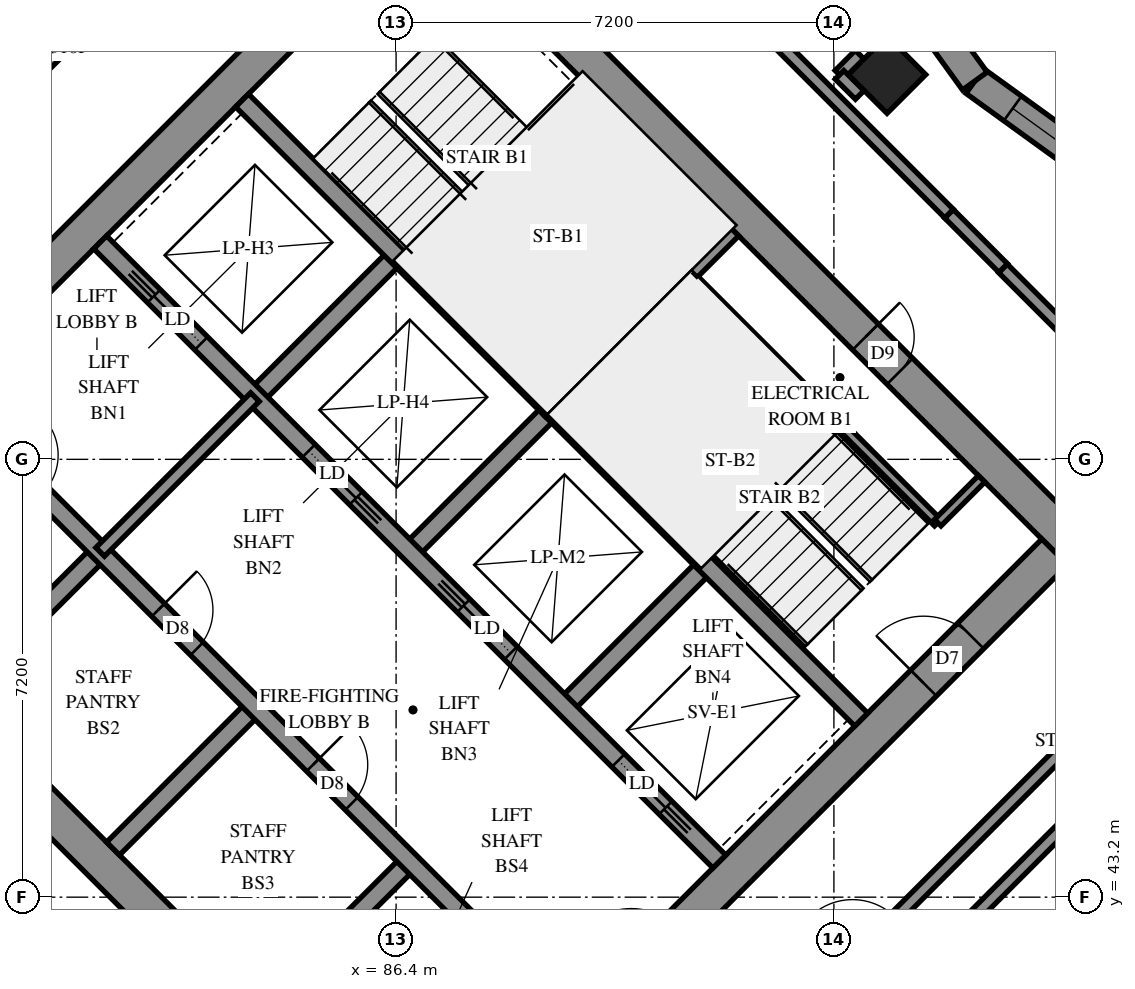
"""IFC4 building model, lengths in metres.
Left out: names, types, materials, properties, quantities, classifications, styles, units other than length and angle.
Written with IfcOpenShell. Run it as: python <this file> out.ifc"""

import sys

from ifc_helpers import new_model, si_unit, direction, frame, frame_2d, origin, origin_2d, place, context, subcontext, project, spatial, polyline, rectangle, outline, extrude, element, fill, save


model = new_model("IFC4")
c1 = context("Model", 3, precision=1e-05, world=origin(), true_north=direction((0.0, 1.0)))
c2 = subcontext(c1, "Body", "Model", "MODEL_VIEW")
j1 = project(units=[si_unit("LENGTHUNIT", "METRE"), si_unit("PLANEANGLEUNIT", "RADIAN")], contexts=[c1])
p1 = place(None, origin())
s1 = spatial("IfcSite", under=j1, at=p1, CompositionType="ELEMENT")
p2 = place(p1, origin())
s2 = spatial("IfcBuilding", under=s1, at=p2, CompositionType="ELEMENT")
p3 = place(p2, frame((0.0, 0.0, 162.6)))
s3 = spatial("IfcBuildingStorey", under=s2, at=p3, CompositionType="ELEMENT", Elevation=162.6)
p4 = place(p3, frame((94.474, 56.727, 0.0), z_axis=(0.0, 0.0, 1.0), x_axis=(0.7071067812, -0.7071067812, 0.0)))
e1 = element("IfcColumn", 1, at=p4, inside=s3, PredefinedType="COLUMN", context=c2, shape_type="SweptSolid", body=[
    extrude(rectangle(XDim=0.9, YDim=0.9, at=origin_2d()), origin(), (0.0, 0.0, 1.0), 3.1),
])
p5 = place(p3, frame((76.018, 49.302, -0.3), z_axis=(0.0, 0.0, 1.0), x_axis=(0.7071067812, -0.7071067812, 0.0)))
e2 = element("IfcWall", 2, at=p5, inside=s3, PredefinedType="SHEAR", context=c2, shape_type="SweptSolid", body=[
    extrude(rectangle(XDim=15.6, YDim=0.6, at=frame_2d((7.8, 0.0))), origin(), (0.0, 0.0, 1.0), 2.7),
])
p6 = place(p3, frame((86.625, 59.908, -0.3), z_axis=(0.0, 0.0, 1.0), x_axis=(0.7071067812, -0.7071067812, 0.0)))
e3 = element("IfcWall", 3, at=p6, inside=s3, PredefinedType="SHEAR", context=c2, shape_type="SweptSolid", body=[
    extrude(rectangle(XDim=15.6, YDim=0.6, at=frame_2d((7.8, 0.0))), origin(), (0.0, 0.0, 1.0), 2.7),
])
p7 = place(p6, frame((10.6, 0.0, 0.3)))
e4 = element("IfcOpeningElement", 4, at=p7, cuts=e3, PredefinedType="OPENING", context=c2, shape_type="SweptSolid", body=[
    extrude(rectangle(XDim=0.8, YDim=2.1, at=frame_2d((0.4, 1.05))), frame((0.0, 0.31, 0.0), z_axis=(0.0, -1.0, 0.0), x_axis=(1.0, 0.0, 0.0)), (0.0, 0.0, 1.0), 0.62),
])
p8 = place(p3, frame((76.442, 49.302, -0.3), z_axis=(0.0, 0.0, 1.0), x_axis=(0.7071067812, 0.7071067812, 0.0)))
e5 = element("IfcWall", 5, at=p8, inside=s3, PredefinedType="SHEAR", context=c2, shape_type="SweptSolid", body=[
    extrude(rectangle(XDim=14.4, YDim=0.6, at=frame_2d((7.2, 0.0))), origin(), (0.0, 0.0, 1.0), 2.7),
])
p9 = place(p8, frame((4.55, 0.0, 0.3)))
e6 = element("IfcOpeningElement", 6, at=p9, cuts=e5, PredefinedType="OPENING", context=c2, shape_type="SweptSolid", body=[
    extrude(rectangle(XDim=1.1, YDim=2.1, at=frame_2d((0.55, 1.05))), frame((0.0, 0.31, 0.0), z_axis=(0.0, -1.0, 0.0), x_axis=(1.0, 0.0, 0.0)), (0.0, 0.0, 1.0), 0.62),
])
p10 = place(p8, frame((11.35, 0.0, 0.3)))
e7 = element("IfcOpeningElement", 7, at=p10, cuts=e5, PredefinedType="OPENING", context=c2, shape_type="SweptSolid", body=[
    extrude(rectangle(XDim=1.1, YDim=2.1, at=frame_2d((0.55, 1.05))), frame((0.0, 0.31, 0.0), z_axis=(0.0, -1.0, 0.0), x_axis=(1.0, 0.0, 0.0)), (0.0, 0.0, 1.0), 0.62),
])
p11 = place(p3, frame((87.049, 38.695, -0.3), z_axis=(0.0, 0.0, 1.0), x_axis=(0.7071067812, 0.7071067812, 0.0)))
e8 = element("IfcWall", 8, at=p11, inside=s3, PredefinedType="SHEAR", context=c2, shape_type="SweptSolid", body=[
    extrude(rectangle(XDim=14.4, YDim=0.6, at=frame_2d((7.2, 0.0))), origin(), (0.0, 0.0, 1.0), 2.7),
])
p12 = place(p11, frame((4.55, 0.0, 0.3)))
e9 = element("IfcOpeningElement", 9, at=p12, cuts=e8, PredefinedType="OPENING", context=c2, shape_type="SweptSolid", body=[
    extrude(rectangle(XDim=1.1, YDim=2.1, at=frame_2d((0.55, 1.05))), frame((0.0, 0.31, 0.0), z_axis=(0.0, -1.0, 0.0), x_axis=(1.0, 0.0, 0.0)), (0.0, 0.0, 1.0), 0.62),
])
p13 = place(p11, frame((11.35, 0.0, 0.3)))
e10 = element("IfcOpeningElement", 10, at=p13, cuts=e8, PredefinedType="OPENING", context=c2, shape_type="SweptSolid", body=[
    extrude(rectangle(XDim=1.1, YDim=2.1, at=frame_2d((0.55, 1.05))), frame((0.0, 0.31, 0.0), z_axis=(0.0, -1.0, 0.0), x_axis=(1.0, 0.0, 0.0)), (0.0, 0.0, 1.0), 0.62),
])
for number, where, z_axis, x_axis in (
    (11, (79.2, 46.544, 0.0), (0.0, 0.0, 1.0), (0.707, 0.707, 0.0)),
    (12, (84.079, 51.423, 0.0), (0.0, 0.0, 1.0), (0.707, 0.707, 0.0)),
):
    element("IfcWall", number, at=place(p3, frame(where, z_axis=z_axis, x_axis=x_axis)), inside=s3, PredefinedType="SOLIDWALL", context=c2, shape_type="SweptSolid", body=[
        extrude(rectangle(XDim=3.3, YDim=0.3, at=frame_2d((1.65, 0.0))), origin(), (0.0, 0.0, 1.0), 3.1),
    ])
p14 = place(p3, frame((81.746, 43.999, 0.0), z_axis=(0.0, 0.0, 1.0), x_axis=(0.7071067812, 0.7071067812, 0.0)))
e13 = element("IfcWall", 13, at=p14, inside=s3, PredefinedType="SOLIDWALL", context=c2, shape_type="SweptSolid", body=[
    extrude(rectangle(XDim=3.3, YDim=0.3, at=frame_2d((1.65, 0.0))), origin(), (0.0, 0.0, 1.0), 3.1),
])
p15 = place(p3, frame((86.625, 48.878, 0.0), z_axis=(0.0, 0.0, 1.0), x_axis=(0.7071067812, 0.7071067812, 0.0)))
e14 = element("IfcWall", 14, at=p15, inside=s3, PredefinedType="SOLIDWALL", context=c2, shape_type="SweptSolid", body=[
    extrude(rectangle(XDim=3.3, YDim=0.3, at=frame_2d((1.65, 0.0))), origin(), (0.0, 0.0, 1.0), 3.1),
])
p16 = place(p3, frame((84.291, 41.453, 0.0), z_axis=(0.0, 0.0, 1.0), x_axis=(0.7071067812, 0.7071067812, 0.0)))
e15 = element("IfcWall", 15, at=p16, inside=s3, PredefinedType="SOLIDWALL", context=c2, shape_type="SweptSolid", body=[
    extrude(rectangle(XDim=3.3, YDim=0.3, at=frame_2d((1.65, 0.0))), origin(), (0.0, 0.0, 1.0), 3.1),
])
p17 = place(p3, frame((89.17, 46.332, 0.0), z_axis=(0.0, 0.0, 1.0), x_axis=(0.7071067812, 0.7071067812, 0.0)))
e16 = element("IfcWall", 16, at=p17, inside=s3, PredefinedType="SOLIDWALL", context=c2, shape_type="SweptSolid", body=[
    extrude(rectangle(XDim=3.3, YDim=0.3, at=frame_2d((1.65, 0.0))), origin(), (0.0, 0.0, 1.0), 3.1),
])
p18 = place(p3, frame((78.988, 51.423, 0.0), z_axis=(0.0, 0.0, 1.0), x_axis=(0.7071067812, -0.7071067812, 0.0)))
e17 = element("IfcWall", 17, at=p18, inside=s3, PredefinedType="SOLIDWALL", context=c2, shape_type="SweptSolid", body=[
    extrude(rectangle(XDim=14.4, YDim=0.3, at=frame_2d((7.2, 0.0))), origin(), (0.0, 0.0, 1.0), 3.1),
])
p19 = place(p18, frame((1.35, 0.0, 0.0)))
e18 = element("IfcOpeningElement", 18, at=p19, cuts=e17, PredefinedType="OPENING", context=c2, shape_type="SweptSolid", body=[
    extrude(rectangle(XDim=0.9, YDim=2.1, at=frame_2d((0.45, 1.05))), frame((0.0, 0.16, 0.0), z_axis=(0.0, -1.0, 0.0), x_axis=(1.0, 0.0, 0.0)), (0.0, 0.0, 1.0), 0.32),
])
p20 = place(p18, frame((4.95, 0.0, 0.0)))
e19 = element("IfcOpeningElement", 19, at=p20, cuts=e17, PredefinedType="OPENING", context=c2, shape_type="SweptSolid", body=[
    extrude(rectangle(XDim=0.9, YDim=2.1, at=frame_2d((0.45, 1.05))), frame((0.0, 0.16, 0.0), z_axis=(0.0, -1.0, 0.0), x_axis=(1.0, 0.0, 0.0)), (0.0, 0.0, 1.0), 0.32),
])
p21 = place(p18, frame((8.55, 0.0, 0.0)))
e20 = element("IfcOpeningElement", 20, at=p21, cuts=e17, PredefinedType="OPENING", context=c2, shape_type="SweptSolid", body=[
    extrude(rectangle(XDim=0.9, YDim=2.1, at=frame_2d((0.45, 1.05))), frame((0.0, 0.16, 0.0), z_axis=(0.0, -1.0, 0.0), x_axis=(1.0, 0.0, 0.0)), (0.0, 0.0, 1.0), 0.32),
])
p22 = place(p18, frame((12.05, 0.0, 0.0)))
e21 = element("IfcOpeningElement", 21, at=p22, cuts=e17, PredefinedType="OPENING", context=c2, shape_type="SweptSolid", body=[
    extrude(rectangle(XDim=1.1, YDim=2.1, at=frame_2d((0.55, 1.05))), frame((0.0, 0.16, 0.0), z_axis=(0.0, -1.0, 0.0), x_axis=(1.0, 0.0, 0.0)), (0.0, 0.0, 1.0), 0.32),
])
p23 = place(p3, frame((81.534, 53.969, 0.0), z_axis=(0.0, 0.0, 1.0), x_axis=(0.707103309, -0.7071102534, 0.0)))
e22 = element("IfcWall", 22, at=p23, inside=s3, PredefinedType="SOLIDWALL", context=c2, shape_type="SweptSolid", body=[
    extrude(rectangle(XDim=14.4, YDim=0.3, at=frame_2d((7.2, 0.0))), origin(), (0.0, 0.0, 1.0), 3.1),
])
p24 = place(p23, frame((1.25, 0.0, 0.0)))
e23 = element("IfcOpeningElement", 23, at=p24, cuts=e22, PredefinedType="OPENING", context=c2, shape_type="SweptSolid", body=[
    extrude(rectangle(XDim=1.1, YDim=2.1, at=frame_2d((0.55, 1.05))), frame((0.0, 0.16, 0.0), z_axis=(0.0, -1.0, 0.0), x_axis=(1.0, 0.0, 0.0)), (0.0, 0.0, 1.0), 0.32),
])
p25 = place(p23, frame((4.85, 0.0, 0.0)))
e24 = element("IfcOpeningElement", 24, at=p25, cuts=e22, PredefinedType="OPENING", context=c2, shape_type="SweptSolid", body=[
    extrude(rectangle(XDim=1.1, YDim=2.1, at=frame_2d((0.55, 1.05))), frame((0.0, 0.16, 0.0), z_axis=(0.0, -1.0, 0.0), x_axis=(1.0, 0.0, 0.0)), (0.0, 0.0, 1.0), 0.32),
])
p26 = place(p23, frame((8.45, 0.0, 0.0)))
e25 = element("IfcOpeningElement", 25, at=p26, cuts=e22, PredefinedType="OPENING", context=c2, shape_type="SweptSolid", body=[
    extrude(rectangle(XDim=1.1, YDim=2.1, at=frame_2d((0.55, 1.05))), frame((0.0, 0.16, 0.0), z_axis=(0.0, -1.0, 0.0), x_axis=(1.0, 0.0, 0.0)), (0.0, 0.0, 1.0), 0.32),
])
p27 = place(p23, frame((12.05, 0.0, 0.0)))
e26 = element("IfcOpeningElement", 26, at=p27, cuts=e22, PredefinedType="OPENING", context=c2, shape_type="SweptSolid", body=[
    extrude(rectangle(XDim=1.1, YDim=2.1, at=frame_2d((0.55, 1.05))), frame((0.0, 0.16, 0.0), z_axis=(0.0, -1.0, 0.0), x_axis=(1.0, 0.0, 0.0)), (0.0, 0.0, 1.0), 0.32),
])
for number, where, z_axis, x_axis in (
    (27, (83.867, 56.302, 0.0), (0.0, 0.0, 1.0), (0.707, -0.707, 0.0)),
    (28, (88.958, 51.211, 0.0), (0.0, 0.0, 1.0), (0.707, -0.707, 0.0)),
):
    element("IfcWall", number, at=place(p3, frame(where, z_axis=z_axis, x_axis=x_axis)), inside=s3, PredefinedType="SOLIDWALL", context=c2, shape_type="SweptSolid", body=[
        extrude(rectangle(XDim=7.2, YDim=0.3, at=frame_2d((3.6, 0.0))), origin(), (0.0, 0.0, 1.0), 3.1),
    ])
p28 = place(p3, frame((88.958, 51.211, 0.0), z_axis=(0.0, 0.0, 1.0), x_axis=(0.7071067812, 0.7071067812, 0.0)))
e29 = element("IfcWall", 29, at=p28, inside=s3, PredefinedType="SOLIDWALL", context=c2, shape_type="SweptSolid", body=[
    extrude(rectangle(XDim=4.2, YDim=0.3, at=frame_2d((2.1, 0.0))), origin(), (0.0, 0.0, 1.0), 3.1),
])
p29 = place(p3, frame((98.692, 54.614, 0.0), z_axis=(0.0, 0.0, 1.0), x_axis=(-0.8101343976, 0.5862441964, 0.0)))
e30 = element("IfcWall", 30, at=p29, inside=s3, PredefinedType="SOLIDWALL", context=c2, shape_type="SweptSolid", body=[
    extrude(outline(polyline([(-0.04, -0.25), (3.384, -0.25), (3.464, 0.25), (0.04, 0.25), (-0.04, -0.25)])), origin(), (0.0, 0.0, 1.0), 3.1),
])
p30 = place(p29, frame((1.456, 0.0, 0.45)))
e31 = element("IfcOpeningElement", 31, at=p30, cuts=e30, PredefinedType="OPENING", context=c2, shape_type="SweptSolid", body=[
    extrude(rectangle(XDim=1.2, YDim=2.5, at=frame_2d((0.6, 1.25))), frame((0.0, 0.26, 0.0), z_axis=(0.0, -1.0, 0.0), x_axis=(1.0, 0.0, 0.0)), (0.0, 0.0, 1.0), 0.52),
])
p31 = place(p3, frame((95.918, 56.621, 0.0), z_axis=(0.0, 0.0, 1.0), x_axis=(-0.586263364, 0.8101205268, 0.0)))
e32 = element("IfcWall", 32, at=p31, inside=s3, PredefinedType="SOLIDWALL", context=c2, shape_type="SweptSolid", body=[
    extrude(outline(polyline([(0.04, -0.25), (3.464, -0.25), (3.384, 0.25), (-0.04, 0.25), (0.04, -0.25)])), origin(), (0.0, 0.0, 1.0), 3.1),
])
p32 = place(p31, frame((1.697, 0.0, 0.45)))
e33 = element("IfcOpeningElement", 33, at=p32, cuts=e32, PredefinedType="OPENING", context=c2, shape_type="SweptSolid", body=[
    extrude(rectangle(XDim=1.2, YDim=2.5, at=frame_2d((0.6, 1.25))), frame((0.0, 0.26, 0.0), z_axis=(0.0, -1.0, 0.0), x_axis=(1.0, 0.0, 0.0)), (0.0, 0.0, 1.0), 0.52),
])
p33 = place(p3, frame((91.313, 53.354, 0.0), z_axis=(0.0, 0.0, 1.0), x_axis=(0.7071067812, -0.7071067812, 0.0)))
e34 = element("IfcWall", 34, at=p33, inside=s3, PredefinedType="PARTITIONING", context=c2, shape_type="SweptSolid", body=[
    extrude(rectangle(XDim=5.65, YDim=0.15, at=frame_2d((2.825, 0.0))), origin(), (0.0, 0.0, 1.0), 3.1),
])
p34 = place(p3, frame((95.308, 49.358, 0.0), z_axis=(0.0, 0.0, 1.0), x_axis=(0.70705776, 0.707155799, 0.0)))
e35 = element("IfcWall", 35, at=p34, inside=s3, PredefinedType="PARTITIONING", context=c2, shape_type="SweptSolid", body=[
    extrude(rectangle(XDim=1.02, YDim=0.15, at=frame_2d((0.51, 0.0))), origin(), (0.0, 0.0, 1.0), 3.1),
])
p35 = place(p3, frame((81.534, 48.878, 0.0), z_axis=(0.0, 0.0, 1.0), x_axis=(0.707092892, 0.7071206701, 0.0)))
e36 = element("IfcWall", 36, at=p35, inside=s3, PredefinedType="PARTITIONING", context=c2, shape_type="SweptSolid", body=[
    extrude(rectangle(XDim=3.6, YDim=0.2, at=frame_2d((1.8, 0.0))), origin(), (0.0, 0.0, 1.0), 3.1),
])
p36 = place(p3, frame((86.841, 63.093, 0.0), z_axis=(0.0, 0.0, 1.0), x_axis=(0.7071067812, -0.7071067812, 0.0)))
e37 = element("IfcWall", 37, at=p36, inside=s3, PredefinedType="PARTITIONING", context=c2, shape_type="SweptSolid", body=[
    extrude(rectangle(XDim=12.239, YDim=0.2, at=frame_2d((6.119, 0.0))), origin(), (0.0, 0.0, 1.0), 3.1),
])
p37 = place(p3, frame((94.401, 41.383, 0.0), z_axis=(0.0, 0.0, 1.0), x_axis=(0.7071067812, 0.7071067812, 0.0)))
e38 = element("IfcWall", 38, at=p37, inside=s3, PredefinedType="PARTITIONING", context=c2, shape_type="SweptSolid", body=[
    extrude(rectangle(XDim=12.066, YDim=0.2, at=frame_2d((6.033, 0.0))), origin(), (0.0, 0.0, 1.0), 3.1),
])
p38 = place(p3, frame((93.767, 42.021, 0.0), z_axis=(0.0, 0.0, 1.0), x_axis=(0.7071067812, 0.7071067812, 0.0)))
e39 = element("IfcWall", 39, at=p38, inside=s3, PredefinedType="PARTITIONING", context=c2, shape_type="SweptSolid", body=[
    extrude(rectangle(XDim=9.998, YDim=0.2, at=frame_2d((4.999, 0.0))), origin(), (0.0, 0.0, 1.0), 3.1),
])
p39 = place(p38, frame((0.196, 0.0, 0.0)))
e40 = element("IfcOpeningElement", 40, at=p39, cuts=e39, PredefinedType="OPENING", context=c2, shape_type="SweptSolid", body=[
    extrude(rectangle(XDim=1.0, YDim=2.1, at=frame_2d((0.5, 1.05))), frame((0.0, 0.11, 0.0), z_axis=(0.0, -1.0, 0.0), x_axis=(1.0, 0.0, 0.0)), (0.0, 0.0, 1.0), 0.22),
])
p40 = place(p3, frame((79.799, 56.055, 0.0), z_axis=(0.0, 0.0, 1.0), x_axis=(0.7071067812, 0.7071067812, 0.0)))
e41 = element("IfcWall", 41, at=p40, inside=s3, PredefinedType="PARTITIONING", context=c2, shape_type="SweptSolid", body=[
    extrude(rectangle(XDim=9.95, YDim=0.2, at=frame_2d((4.975, 0.0))), origin(), (0.0, 0.0, 1.0), 3.1),
])
p41 = place(p40, frame((1.071, 0.0, 0.0)))
e42 = element("IfcOpeningElement", 42, at=p41, cuts=e41, PredefinedType="OPENING", context=c2, shape_type="SweptSolid", body=[
    extrude(rectangle(XDim=1.0, YDim=2.1, at=frame_2d((0.5, 1.05))), frame((0.0, 0.11, 0.0), z_axis=(0.0, -1.0, 0.0), x_axis=(1.0, 0.0, 0.0)), (0.0, 0.0, 1.0), 0.22),
])
p42 = place(p3, frame((96.379, 53.541, 0.0), z_axis=(0.0, 0.0, 1.0), x_axis=(0.7071067812, -0.7071067812, 0.0)))
e43 = element("IfcWall", 43, at=p42, inside=s3, PredefinedType="PARTITIONING", context=c2, shape_type="SweptSolid", body=[
    extrude(rectangle(XDim=4.2, YDim=0.2, at=frame_2d((2.1, 0.0))), origin(), (0.0, 0.0, 1.0), 3.1),
])
p43 = place(p3, frame((95.494, 54.438, 0.0), z_axis=(0.0, 0.0, 1.0), x_axis=(0.706312726, -0.7078999456, 0.0)))
e44 = element("IfcWall", 44, at=p43, inside=s3, PredefinedType="PARTITIONING", context=c2, shape_type="SweptSolid", body=[
    extrude(rectangle(XDim=1.26, YDim=0.2, at=frame_2d((0.63, 0.0))), origin(), (0.0, 0.0, 1.0), 3.1),
])
p44 = place(p3, frame((93.691, 56.723, 0.0), z_axis=(0.0, 0.0, 1.0), x_axis=(0.7071067812, 0.7071067812, 0.0)))
e45 = element("IfcWall", 45, at=p44, inside=s3, PredefinedType="PARTITIONING", context=c2, shape_type="SweptSolid", body=[
    extrude(rectangle(XDim=0.469, YDim=0.2, at=frame_2d((0.235, 0.0))), origin(), (0.0, 0.0, 1.0), 3.1),
])
p45 = place(p3, frame((93.692, 56.722, 0.0), z_axis=(0.0, 0.0, 1.0), x_axis=(0.7092398187, -0.7049672897, 0.0)))
e46 = element("IfcWall", 46, at=p45, inside=s3, PredefinedType="PARTITIONING", context=c2, shape_type="SweptSolid", body=[
    extrude(rectangle(XDim=0.468, YDim=0.2, at=frame_2d((0.234, 0.0))), origin(), (0.0, 0.0, 1.0), 3.1),
])
p46 = place(p30, origin())
e47 = element("IfcWindow", 47, at=p46, inside=s3, PartitioningType="SINGLE_PANEL", PredefinedType="WINDOW", context=c2, shape_type="SweptSolid", body=[
    extrude(rectangle(XDim=1.2, YDim=2.5, at=frame_2d((0.6, 1.25))), frame((0.0, 0.18, 0.0), z_axis=(0.0, -1.0, 0.0), x_axis=(1.0, 0.0, 0.0)), (0.0, 0.0, 1.0), 0.06),
])
fill(e31, e47)
p47 = place(p7, origin())
e48 = element("IfcDoor", 48, at=p47, inside=s3, OperationType="SINGLE_SWING_RIGHT", PredefinedType="DOOR", context=c2, shape_type="SweptSolid", body=[
    extrude(rectangle(XDim=0.8, YDim=2.1, at=frame_2d((0.4, 1.05))), frame((0.0, 0.025, 0.0), z_axis=(0.0, -1.0, 0.0), x_axis=(1.0, 0.0, 0.0)), (0.0, 0.0, 1.0), 0.05),
])
fill(e4, e48)
p48 = place(p13, origin())
e49 = element("IfcDoor", 49, at=p48, inside=s3, OperationType="SINGLE_SWING_RIGHT", PredefinedType="DOOR", context=c2, shape_type="SweptSolid", body=[
    extrude(rectangle(XDim=1.1, YDim=2.1, at=frame_2d((0.55, 1.05))), frame((0.0, 0.025, 0.0), z_axis=(0.0, -1.0, 0.0), x_axis=(1.0, 0.0, 0.0)), (0.0, 0.0, 1.0), 0.05),
])
fill(e10, e49)
p49 = place(p20, origin())
e50 = element("IfcDoor", 50, at=p49, inside=s3, OperationType="SINGLE_SWING_LEFT", PredefinedType="DOOR", context=c2, shape_type="SweptSolid", body=[
    extrude(rectangle(XDim=0.9, YDim=2.1, at=frame_2d((0.45, 1.05))), frame((0.0, 0.025, 0.0), z_axis=(0.0, -1.0, 0.0), x_axis=(1.0, 0.0, 0.0)), (0.0, 0.0, 1.0), 0.05),
])
fill(e19, e50)
p50 = place(p21, origin())
e51 = element("IfcDoor", 51, at=p50, inside=s3, OperationType="SINGLE_SWING_LEFT", PredefinedType="DOOR", context=c2, shape_type="SweptSolid", body=[
    extrude(rectangle(XDim=0.9, YDim=2.1, at=frame_2d((0.45, 1.05))), frame((0.0, 0.025, 0.0), z_axis=(0.0, -1.0, 0.0), x_axis=(1.0, 0.0, 0.0)), (0.0, 0.0, 1.0), 0.05),
])
fill(e20, e51)
p51 = place(p24, origin())
e52 = element("IfcDoor", 52, at=p51, inside=s3, OperationType="SLIDING_TO_LEFT", PredefinedType="DOOR", context=c2, shape_type="SweptSolid", body=[
    extrude(rectangle(XDim=1.1, YDim=2.1, at=frame_2d((0.55, 1.05))), frame((0.0, 0.025, 0.0), z_axis=(0.0, -1.0, 0.0), x_axis=(1.0, 0.0, 0.0)), (0.0, 0.0, 1.0), 0.05),
])
fill(e23, e52)
p52 = place(p25, origin())
e53 = element("IfcDoor", 53, at=p52, inside=s3, OperationType="SLIDING_TO_RIGHT", PredefinedType="DOOR", context=c2, shape_type="SweptSolid", body=[
    extrude(rectangle(XDim=1.1, YDim=2.1, at=frame_2d((0.55, 1.05))), frame((0.0, 0.025, 0.0), z_axis=(0.0, -1.0, 0.0), x_axis=(1.0, 0.0, 0.0)), (0.0, 0.0, 1.0), 0.05),
])
fill(e24, e53)
p53 = place(p26, origin())
e54 = element("IfcDoor", 54, at=p53, inside=s3, OperationType="SLIDING_TO_LEFT", PredefinedType="DOOR", context=c2, shape_type="SweptSolid", body=[
    extrude(rectangle(XDim=1.1, YDim=2.1, at=frame_2d((0.55, 1.05))), frame((0.0, 0.025, 0.0), z_axis=(0.0, -1.0, 0.0), x_axis=(1.0, 0.0, 0.0)), (0.0, 0.0, 1.0), 0.05),
])
fill(e25, e54)
p54 = place(p27, origin())
e55 = element("IfcDoor", 55, at=p54, inside=s3, OperationType="SLIDING_TO_RIGHT", PredefinedType="DOOR", context=c2, shape_type="SweptSolid", body=[
    extrude(rectangle(XDim=1.1, YDim=2.1, at=frame_2d((0.55, 1.05))), frame((0.0, 0.025, 0.0), z_axis=(0.0, -1.0, 0.0), x_axis=(1.0, 0.0, 0.0)), (0.0, 0.0, 1.0), 0.05),
])
fill(e26, e55)
p55 = place(p41, origin())
e56 = element("IfcDoor", 56, at=p55, inside=s3, OperationType="SINGLE_SWING_RIGHT", PredefinedType="DOOR", context=c2, shape_type="SweptSolid", body=[
    extrude(rectangle(XDim=1.0, YDim=2.1, at=frame_2d((0.5, 1.05))), frame((0.0, 0.025, 0.0), z_axis=(0.0, -1.0, 0.0), x_axis=(1.0, 0.0, 0.0)), (0.0, 0.0, 1.0), 0.05),
])
fill(e42, e56)
save(model, sys.argv[1])
